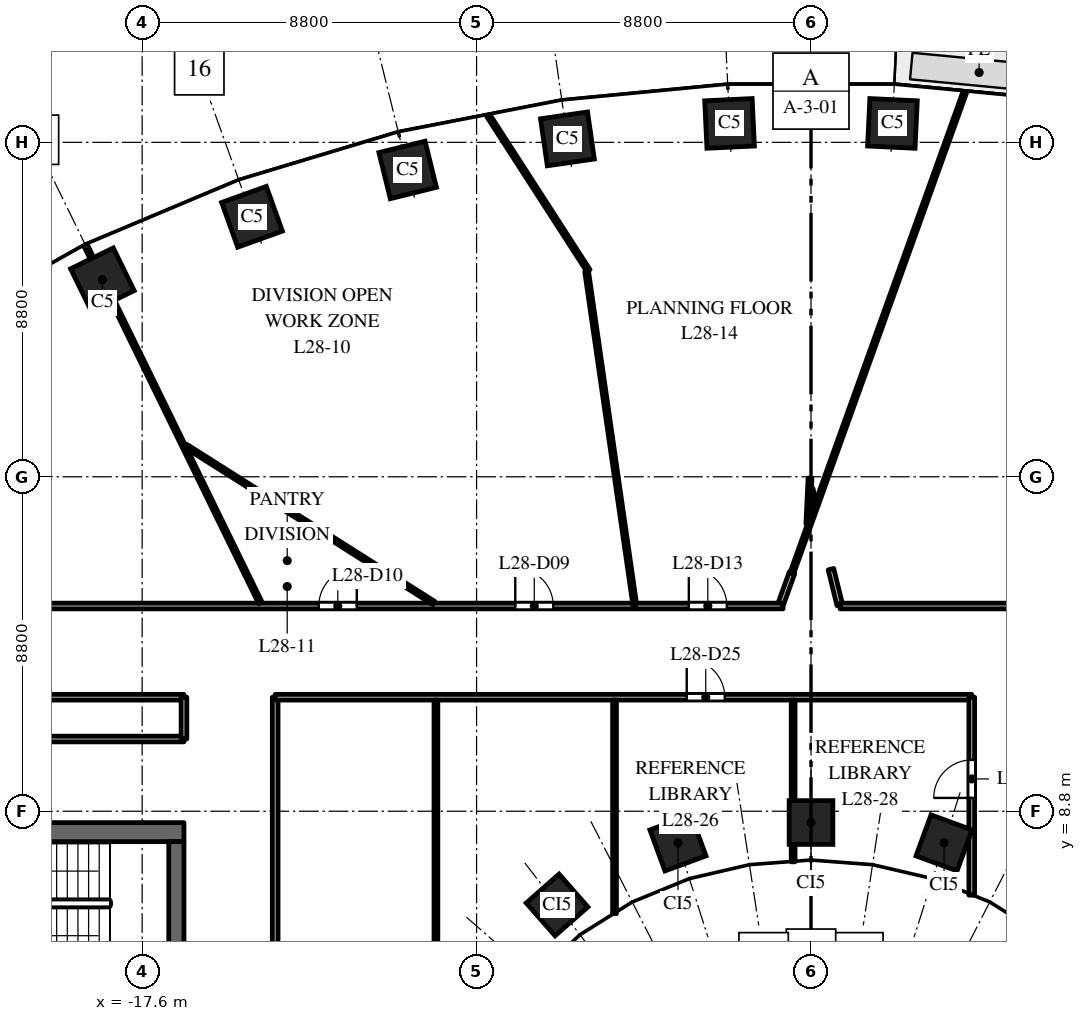
"""IFC4 building model, lengths in metres.
Left out: names, types, materials, properties, quantities, classifications, styles, units other than length and angle.
Written with IfcOpenShell. Run it as: python <this file> out.ifc"""

import sys

from ifc_helpers import new_model, si_unit, direction, frame, frame_2d, origin, origin_2d, place, context, subcontext, project, spatial, rectangle, extrude, element, fill, save


model = new_model("IFC4")
c1 = context("Model", 3, precision=1e-05, world=origin(), true_north=direction((0.0, 1.0)))
c2 = subcontext(c1, "Body", "Model", "MODEL_VIEW")
j1 = project(units=[si_unit("LENGTHUNIT", "METRE"), si_unit("PLANEANGLEUNIT", "RADIAN")], contexts=[c1])
p1 = place(None, origin())
s1 = spatial("IfcSite", under=j1, at=p1, CompositionType="ELEMENT")
p2 = place(p1, origin())
s2 = spatial("IfcBuilding", under=s1, at=p2, CompositionType="ELEMENT")
p3 = place(p2, frame((0.0, 0.0, 124.0)))
s3 = spatial("IfcBuildingStorey", under=s2, at=p3, CompositionType="ELEMENT", Elevation=124.0)
for number, where, z_axis, x_axis in (
    (1, (2.143, 26.898, 0.0), (0.0, 0.0, 1.0), (-0.999, 0.048, 0.0)),
    (2, (-2.143, 26.898, 0.0), (0.0, 0.0, 1.0), (-0.999, -0.048, 0.0)),
    (3, (-6.409, 26.491, 0.0), (0.0, 0.0, 1.0), (-0.99, -0.143, 0.0)),
    (4, (-10.613, 25.674, 0.0), (0.0, 0.0, 1.0), (-0.971, -0.24, 0.0)),
    (5, (-14.709, 24.441, 0.0), (0.0, 0.0, 1.0), (-0.941, -0.338, 0.0)),
    (6, (-18.646, 22.785, 0.0), (0.0, 0.0, 1.0), (-0.898, -0.439, 0.0)),
):
    element("IfcColumn", number, at=place(p3, frame(where, z_axis=z_axis, x_axis=x_axis)), inside=s3, PredefinedType="COLUMN", context=c2, shape_type="SweptSolid", body=[
        extrude(rectangle(XDim=1.25, YDim=1.25, at=origin_2d()), origin(), (0.0, 0.0, 1.0), 4.0),
    ])
for number, where, z_axis, x_axis in (
    (7, (3.501, 7.967, 0.0), (0.0, 0.0, 1.0), (-0.939, 0.344, 0.0)),
    (8, (0.0, 8.503, 0.0), (0.0, 0.0, 1.0), (-1.0, 0.0, 0.0)),
    (9, (-3.501, 7.967, 0.0), (0.0, 0.0, 1.0), (-0.939, -0.344, 0.0)),
    (10, (-6.682, 6.334, 0.0), (0.0, 0.0, 1.0), (-0.751, -0.66, 0.0)),
):
    element("IfcColumn", number, at=place(p3, frame(where, z_axis=z_axis, x_axis=x_axis)), inside=s3, PredefinedType="COLUMN", context=c2, shape_type="SweptSolid", body=[
        extrude(rectangle(XDim=1.15, YDim=1.15, at=origin_2d()), origin(), (0.0, 0.0, 1.0), 4.0),
    ])
p4 = place(p3, frame((-16.5, 8.25, 0.0), z_axis=(0.0, 0.0, 1.0), x_axis=(-1.0, 0.0, 0.0)))
e11 = element("IfcWall", 11, at=p4, inside=s3, PredefinedType="SHEAR", context=c2, shape_type="SweptSolid", body=[
    extrude(rectangle(XDim=15.0, YDim=0.5, at=frame_2d((7.5, 0.0))), origin(), (0.0, 0.0, 1.0), 3.7),
])
p5 = place(p4, frame((6.9, 0.0, 0.0)))
e12 = element("IfcOpeningElement", 12, at=p5, cuts=e11, PredefinedType="OPENING", context=c2, shape_type="SweptSolid", body=[
    extrude(rectangle(XDim=1.2, YDim=2.1, at=frame_2d((0.6, 1.05))), frame((0.0, 0.26, 0.0), z_axis=(0.0, -1.0, 0.0), x_axis=(1.0, 0.0, 0.0)), (0.0, 0.0, 1.0), 0.52),
])
p6 = place(p4, frame((12.275, 0.0, 0.0)))
e13 = element("IfcOpeningElement", 13, at=p6, cuts=e11, PredefinedType="OPENING", context=c2, shape_type="SweptSolid", body=[
    extrude(rectangle(XDim=0.9, YDim=2.1, at=frame_2d((0.45, 1.05))), frame((0.0, 0.26, 0.0), z_axis=(0.0, -1.0, 0.0), x_axis=(1.0, 0.0, 0.0)), (0.0, 0.0, 1.0), 0.52),
])
p7 = place(p3, frame((-16.7, -8.0, 0.0), z_axis=(0.0, 0.0, 1.0), x_axis=(0.0, 1.0, 0.0)))
e14 = element("IfcWall", 14, at=p7, inside=s3, PredefinedType="SHEAR", context=c2, shape_type="SweptSolid", body=[
    extrude(rectangle(XDim=16.0, YDim=0.4, at=frame_2d((8.0, 0.0))), origin(), (0.0, 0.0, 1.0), 3.7),
])
p8 = place(p3, frame((-31.5, 10.7, 0.0), z_axis=(0.0, 0.0, 1.0), x_axis=(1.0, 0.0, 0.0)))
e15 = element("IfcWall", 15, at=p8, inside=s3, PredefinedType="PARTITIONING", context=c2, shape_type="SweptSolid", body=[
    extrude(rectangle(XDim=15.0, YDim=0.15, at=frame_2d((7.5, 0.0))), origin(), (0.0, 0.0, 1.0), 3.1),
])
p9 = place(p8, frame((5.35, 0.0, 0.0)))
e16 = element("IfcOpeningElement", 16, at=p9, cuts=e15, PredefinedType="OPENING", context=c2, shape_type="SweptSolid", body=[
    extrude(rectangle(XDim=1.0, YDim=2.1, at=frame_2d((0.5, 1.05))), frame((0.0, 0.085, 0.0), z_axis=(0.0, -1.0, 0.0), x_axis=(1.0, 0.0, 0.0)), (0.0, 0.0, 1.0), 0.17),
])
p10 = place(p3, frame((-25.0, 11.8, 0.0), z_axis=(0.0, 0.0, 1.0), x_axis=(1.0, 0.0, 0.0)))
e17 = element("IfcWall", 17, at=p10, inside=s3, PredefinedType="PARTITIONING", context=c2, shape_type="SweptSolid", body=[
    extrude(rectangle(XDim=8.5, YDim=0.15, at=frame_2d((4.25, 0.0))), origin(), (0.0, 0.0, 1.0), 2.75),
])
p11 = place(p3, frame((-25.0, 14.2, 0.0), z_axis=(0.0, 0.0, 1.0), x_axis=(1.0, 0.0, 0.0)))
e18 = element("IfcWall", 18, at=p11, inside=s3, PredefinedType="PARTITIONING", context=c2, shape_type="SweptSolid", body=[
    extrude(rectangle(XDim=20.348, YDim=0.15, at=frame_2d((10.174, 0.0))), origin(), (0.0, 0.0, 1.0), 2.75),
])
p12 = place(p11, frame((17.218, 0.0, 0.0)))
e19 = element("IfcOpeningElement", 19, at=p12, cuts=e18, PredefinedType="OPENING", context=c2, shape_type="SweptSolid", body=[
    extrude(rectangle(XDim=1.0, YDim=2.1, at=frame_2d((0.5, 1.05))), frame((0.0, 0.085, 0.0), z_axis=(0.0, -1.0, 0.0), x_axis=(1.0, 0.0, 0.0)), (0.0, 0.0, 1.0), 0.17),
])
p13 = place(p11, frame((12.048, 0.0, 0.0)))
e20 = element("IfcOpeningElement", 20, at=p13, cuts=e18, PredefinedType="OPENING", context=c2, shape_type="SweptSolid", body=[
    extrude(rectangle(XDim=1.0, YDim=2.1, at=frame_2d((0.5, 1.05))), frame((0.0, 0.085, 0.0), z_axis=(0.0, -1.0, 0.0), x_axis=(1.0, 0.0, 0.0)), (0.0, 0.0, 1.0), 0.17),
])
p14 = place(p3, frame((-19.086, 23.685, 0.0), z_axis=(0.0, 0.0, 1.0), x_axis=(0.439164543904, -0.898406647002, 0.0)))
e21 = element("IfcWall", 21, at=p14, inside=s3, PredefinedType="PARTITIONING", context=c2, shape_type="SweptSolid", body=[
    extrude(rectangle(XDim=10.47, YDim=0.1, at=frame_2d((5.235, 0.0))), origin(), (0.0, 0.0, 1.0), 3.7),
])
p15 = place(p3, frame((-16.452, 18.412, 0.0), z_axis=(0.0, 0.0, 1.0), x_axis=(0.844813363526, -0.535061100069, 0.0)))
e22 = element("IfcWall", 22, at=p15, inside=s3, PredefinedType="PARTITIONING", context=c2, shape_type="SweptSolid", body=[
    extrude(rectangle(XDim=7.728, YDim=0.1, at=frame_2d((3.864, 0.0))), origin(), (0.0, 0.0, 1.0), 2.85),
])
p16 = place(p3, frame((-16.5, 10.7, 0.0), z_axis=(0.0, 0.0, 1.0), x_axis=(0.0, 1.0, 0.0)))
e23 = element("IfcWall", 23, at=p16, inside=s3, PredefinedType="PARTITIONING", context=c2, shape_type="SweptSolid", body=[
    extrude(rectangle(XDim=1.1, YDim=0.15, at=frame_2d((0.55, 0.0))), origin(), (0.0, 0.0, 1.0), 2.75),
])
p17 = place(p3, frame((-14.1, -11.8, 0.0), z_axis=(0.0, 0.0, 1.0), x_axis=(0.0, 1.0, 0.0)))
e24 = element("IfcWall", 24, at=p17, inside=s3, PredefinedType="PARTITIONING", context=c2, shape_type="SweptSolid", body=[
    extrude(rectangle(XDim=23.6, YDim=0.15, at=frame_2d((11.8, 0.0))), origin(), (0.0, 0.0, 1.0), 2.75),
])
p18 = place(p17, frame((11.4, 0.0, 0.0)))
e25 = element("IfcOpeningElement", 25, at=p18, cuts=e24, PredefinedType="OPENING", context=c2, shape_type="SweptSolid", body=[
    extrude(rectangle(XDim=1.0, YDim=2.1, at=frame_2d((0.5, 1.05))), frame((0.0, 0.085, 0.0), z_axis=(0.0, -1.0, 0.0), x_axis=(1.0, 0.0, 0.0)), (0.0, 0.0, 1.0), 0.17),
])
p19 = place(p3, frame((-14.1, 11.8, 0.0), z_axis=(0.0, 0.0, 1.0), x_axis=(1.0, 0.0, 0.0)))
e26 = element("IfcWall", 26, at=p19, inside=s3, PredefinedType="PARTITIONING", context=c2, shape_type="SweptSolid", body=[
    extrude(rectangle(XDim=18.33, YDim=0.15, at=frame_2d((9.165, 0.0))), origin(), (0.0, 0.0, 1.0), 2.85),
])
p20 = place(p19, frame((10.83, 0.0, 0.0)))
e27 = element("IfcOpeningElement", 27, at=p20, cuts=e26, PredefinedType="OPENING", context=c2, shape_type="SweptSolid", body=[
    extrude(rectangle(XDim=1.0, YDim=2.1, at=frame_2d((0.5, 1.05))), frame((0.0, 0.085, 0.0), z_axis=(0.0, -1.0, 0.0), x_axis=(1.0, 0.0, 0.0)), (0.0, 0.0, 1.0), 0.17),
])
p21 = place(p3, frame((-9.87, -11.725, 0.0), z_axis=(0.0, 0.0, 1.0), x_axis=(0.0, 1.0, 0.0)))
e28 = element("IfcWall", 28, at=p21, inside=s3, PredefinedType="PARTITIONING", context=c2, shape_type="SweptSolid", body=[
    extrude(rectangle(XDim=23.45, YDim=0.1, at=frame_2d((11.725, 0.0))), origin(), (0.0, 0.0, 1.0), 2.75),
])
p22 = place(p3, frame((-8.491, 27.104, 0.0), z_axis=(0.0, 0.0, 1.0), x_axis=(0.542285995048, -0.840193965448, 0.0)))
e29 = element("IfcWall", 29, at=p22, inside=s3, PredefinedType="PARTITIONING", context=c2, shape_type="SweptSolid", body=[
    extrude(rectangle(XDim=4.857, YDim=0.1, at=frame_2d((2.429, 0.0))), origin(), (0.0, 0.0, 1.0), 2.9),
])
p23 = place(p3, frame((-5.905, 23.005, 0.0), z_axis=(0.0, 0.0, 1.0), x_axis=(0.14308471533, -0.989710444645, 0.0)))
e30 = element("IfcWall", 30, at=p23, inside=s3, PredefinedType="PARTITIONING", context=c2, shape_type="SweptSolid", body=[
    extrude(rectangle(XDim=8.896, YDim=0.1, at=frame_2d((4.448, 0.0))), origin(), (0.0, 0.0, 1.0), 3.7),
])
p24 = place(p3, frame((-5.17, 6.105, 0.0), z_axis=(0.0, 0.0, 1.0), x_axis=(0.0, 1.0, 0.0)))
e31 = element("IfcWall", 31, at=p24, inside=s3, PredefinedType="PARTITIONING", context=c2, shape_type="SweptSolid", body=[
    extrude(rectangle(XDim=5.62, YDim=0.1, at=frame_2d((2.81, 0.0))), origin(), (0.0, 0.0, 1.0), 2.9),
])
p25 = place(p3, frame((-4.632, 14.2, 0.0), z_axis=(0.0, 0.0, 1.0), x_axis=(1.0, 0.0, 0.0)))
e32 = element("IfcWall", 32, at=p25, inside=s3, PredefinedType="PARTITIONING", context=c2, shape_type="SweptSolid", body=[
    extrude(rectangle(XDim=3.897, YDim=0.15, at=frame_2d((1.948, 0.0))), origin(), (0.0, 0.0, 1.0), 2.85),
])
p26 = place(p25, frame((1.417, 0.0, 0.0)))
e33 = element("IfcOpeningElement", 33, at=p26, cuts=e32, PredefinedType="OPENING", context=c2, shape_type="SweptSolid", body=[
    extrude(rectangle(XDim=1.0, YDim=2.1, at=frame_2d((0.5, 1.05))), frame((0.0, 0.085, 0.0), z_axis=(0.0, -1.0, 0.0), x_axis=(1.0, 0.0, 0.0)), (0.0, 0.0, 1.0), 0.17),
])
p27 = place(p3, frame((-0.788, 14.275, 0.0), z_axis=(0.0, 0.0, 1.0), x_axis=(0.339806666964, 0.940495310508, 0.0)))
e34 = element("IfcWall", 34, at=p27, inside=s3, PredefinedType="PARTITIONING", context=c2, shape_type="SweptSolid", body=[
    extrude(rectangle(XDim=0.851, YDim=0.15, at=frame_2d((0.425, 0.0))), origin(), (0.0, 0.0, 1.0), 3.7),
])
p28 = place(p3, frame((-0.509, 15.051, 0.0), z_axis=(0.0, 0.0, 1.0), x_axis=(0.338401519309, 0.941001812819, 0.0)))
e35 = element("IfcWall", 35, at=p28, inside=s3, PredefinedType="PARTITIONING", context=c2, shape_type="SweptSolid", body=[
    extrude(rectangle(XDim=13.46, YDim=0.1, at=frame_2d((6.73, 0.0))), origin(), (0.0, 0.0, 1.0), 2.9),
])
p29 = place(p3, frame((-0.47, 7.469, 0.0), z_axis=(0.0, 0.0, 1.0), x_axis=(0.0, 1.0, 0.0)))
e36 = element("IfcWall", 36, at=p29, inside=s3, PredefinedType="PARTITIONING", context=c2, shape_type="SweptSolid", body=[
    extrude(rectangle(XDim=4.256, YDim=0.1, at=frame_2d((2.128, 0.0))), origin(), (0.0, 0.0, 1.0), 2.9),
])
p30 = place(p3, frame((-0.084, 16.356, 0.0), z_axis=(0.0, 0.0, 1.0), x_axis=(0.047967320325, 0.998848905581, 0.0)))
e37 = element("IfcWall", 37, at=p30, inside=s3, PredefinedType="PARTITIONING", context=c2, shape_type="SweptSolid", body=[
    extrude(rectangle(XDim=1.211, YDim=0.1, at=frame_2d((0.606, 0.0))), origin(), (0.0, 0.0, 1.0), 3.7),
])
p31 = place(p3, frame((0.002, 17.284, 0.0), z_axis=(0.0, 0.0, 1.0), x_axis=(0.240121592304, -0.970742819139, 0.0)))
e38 = element("IfcWall", 38, at=p31, inside=s3, PredefinedType="PARTITIONING", context=c2, shape_type="SweptSolid", body=[
    extrude(rectangle(XDim=0.405, YDim=0.1, at=frame_2d((0.202, 0.0))), origin(), (0.0, 0.0, 1.0), 3.7),
])
p32 = place(p3, frame((0.525, 15.169, 0.0), z_axis=(0.0, 0.0, 1.0), x_axis=(0.239336638609, -0.97093664748, 0.0)))
e39 = element("IfcWall", 39, at=p32, inside=s3, PredefinedType="PARTITIONING", context=c2, shape_type="SweptSolid", body=[
    extrude(rectangle(XDim=0.97, YDim=0.15, at=frame_2d((0.485, 0.0))), origin(), (0.0, 0.0, 1.0), 3.7),
])
p33 = place(p3, frame((0.764, 14.2, 0.0), z_axis=(0.0, 0.0, 1.0), x_axis=(1.0, 0.0, 0.0)))
e40 = element("IfcWall", 40, at=p33, inside=s3, PredefinedType="PARTITIONING", context=c2, shape_type="SweptSolid", body=[
    extrude(rectangle(XDim=24.236, YDim=0.15, at=frame_2d((12.118, 0.0))), origin(), (0.0, 0.0, 1.0), 2.85),
])
p34 = place(p33, frame((6.294, 0.0, 0.0)))
e41 = element("IfcOpeningElement", 41, at=p34, cuts=e40, PredefinedType="OPENING", context=c2, shape_type="SweptSolid", body=[
    extrude(rectangle(XDim=1.0, YDim=2.1, at=frame_2d((0.5, 1.05))), frame((0.0, 0.085, 0.0), z_axis=(0.0, -1.0, 0.0), x_axis=(1.0, 0.0, 0.0)), (0.0, 0.0, 1.0), 0.17),
])
p35 = place(p33, frame((18.336, 0.0, 0.0)))
e42 = element("IfcOpeningElement", 42, at=p35, cuts=e40, PredefinedType="OPENING", context=c2, shape_type="SweptSolid", body=[
    extrude(rectangle(XDim=1.0, YDim=2.1, at=frame_2d((0.5, 1.05))), frame((0.0, 0.085, 0.0), z_axis=(0.0, -1.0, 0.0), x_axis=(1.0, 0.0, 0.0)), (0.0, 0.0, 1.0), 0.17),
])
p36 = place(p3, frame((4.23, 6.592, 0.0), z_axis=(0.0, 0.0, 1.0), x_axis=(0.0, 1.0, 0.0)))
e43 = element("IfcWall", 43, at=p36, inside=s3, PredefinedType="PARTITIONING", context=c2, shape_type="SweptSolid", body=[
    extrude(rectangle(XDim=5.208, YDim=0.15, at=frame_2d((2.604, 0.0))), origin(), (0.0, 0.0, 1.0), 2.9),
])
p37 = place(p36, frame((2.558, 0.0, 0.0)))
e44 = element("IfcOpeningElement", 44, at=p37, cuts=e43, PredefinedType="OPENING", context=c2, shape_type="SweptSolid", body=[
    extrude(rectangle(XDim=1.0, YDim=2.1, at=frame_2d((0.5, 1.05))), frame((0.0, 0.085, 0.0), z_axis=(0.0, -1.0, 0.0), x_axis=(1.0, 0.0, 0.0)), (0.0, 0.0, 1.0), 0.17),
])
p38 = place(p12, origin())
e45 = element("IfcDoor", 45, at=p38, inside=s3, OperationType="SINGLE_SWING_LEFT", PredefinedType="DOOR", context=c2, shape_type="SweptSolid", body=[
    extrude(rectangle(XDim=1.0, YDim=2.1, at=frame_2d((0.5, 1.05))), frame((0.0, 0.025, 0.0), z_axis=(0.0, -1.0, 0.0), x_axis=(1.0, 0.0, 0.0)), (0.0, 0.0, 1.0), 0.05),
])
fill(e19, e45)
p39 = place(p13, origin())
e46 = element("IfcDoor", 46, at=p39, inside=s3, OperationType="SINGLE_SWING_RIGHT", PredefinedType="DOOR", context=c2, shape_type="SweptSolid", body=[
    extrude(rectangle(XDim=1.0, YDim=2.1, at=frame_2d((0.5, 1.05))), frame((0.0, 0.025, 0.0), z_axis=(0.0, -1.0, 0.0), x_axis=(1.0, 0.0, 0.0)), (0.0, 0.0, 1.0), 0.05),
])
fill(e20, e46)
p40 = place(p26, origin())
e47 = element("IfcDoor", 47, at=p40, inside=s3, OperationType="SINGLE_SWING_LEFT", PredefinedType="DOOR", context=c2, shape_type="SweptSolid", body=[
    extrude(rectangle(XDim=1.0, YDim=2.1, at=frame_2d((0.5, 1.05))), frame((0.0, 0.025, 0.0), z_axis=(0.0, -1.0, 0.0), x_axis=(1.0, 0.0, 0.0)), (0.0, 0.0, 1.0), 0.05),
])
fill(e33, e47)
p41 = place(p20, origin())
e48 = element("IfcDoor", 48, at=p41, inside=s3, OperationType="SINGLE_SWING_LEFT", PredefinedType="DOOR", context=c2, shape_type="SweptSolid", body=[
    extrude(rectangle(XDim=1.0, YDim=2.1, at=frame_2d((0.5, 1.05))), frame((0.0, 0.025, 0.0), z_axis=(0.0, -1.0, 0.0), x_axis=(1.0, 0.0, 0.0)), (0.0, 0.0, 1.0), 0.05),
])
fill(e27, e48)
p42 = place(p37, origin())
e49 = element("IfcDoor", 49, at=p42, inside=s3, OperationType="SINGLE_SWING_LEFT", PredefinedType="DOOR", context=c2, shape_type="SweptSolid", body=[
    extrude(rectangle(XDim=1.0, YDim=2.1, at=frame_2d((0.5, 1.05))), frame((0.0, 0.025, 0.0), z_axis=(0.0, -1.0, 0.0), x_axis=(1.0, 0.0, 0.0)), (0.0, 0.0, 1.0), 0.05),
])
fill(e44, e49)
save(model, sys.argv[1])
